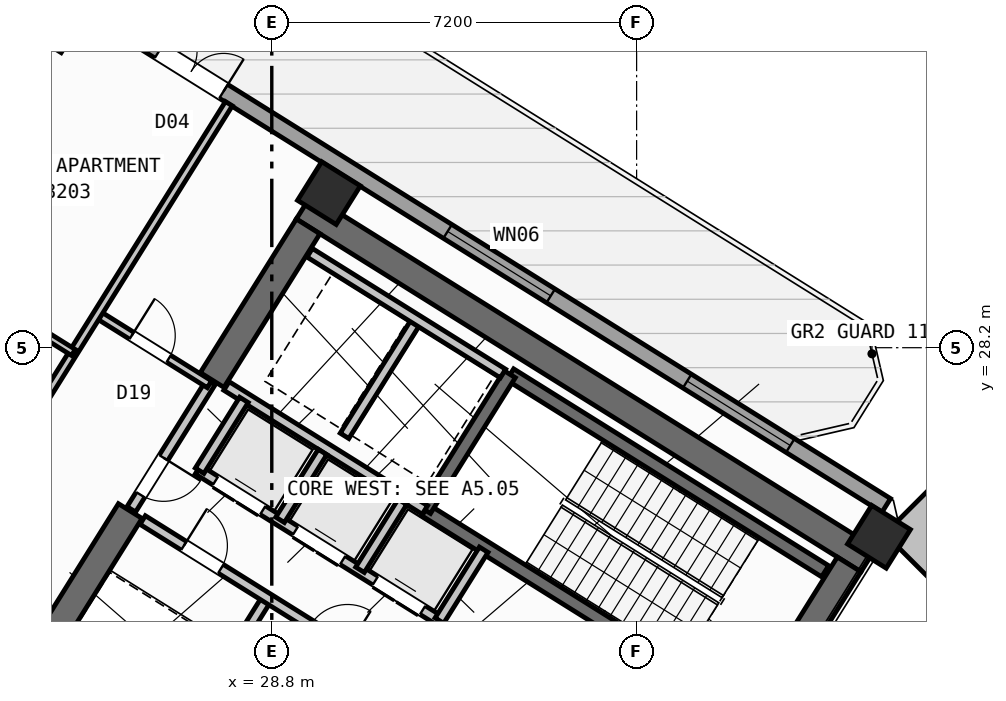
"""IFC4 building model, lengths in metres.
Left out: names, types, materials, properties, quantities, classifications, styles, units other than length and angle.
Written with IfcOpenShell. Run it as: python <this file> out.ifc"""

import sys

from ifc_helpers import new_model, si_unit, direction, frame, frame_2d, origin, origin_2d, place, context, subcontext, project, spatial, rectangle, hollow_rectangle, extrude, source, transform, mapped, element, fill, save


model = new_model("IFC4")
c1 = context("Model", 3, precision=1e-05, world=origin(), true_north=direction((0.0, 1.0)))
c2 = subcontext(c1, "Body", "Model", "MODEL_VIEW")
j1 = project(units=[si_unit("LENGTHUNIT", "METRE"), si_unit("PLANEANGLEUNIT", "RADIAN")], contexts=[c1])
p1 = place(None, origin())
s1 = spatial("IfcSite", under=j1, at=p1, CompositionType="ELEMENT")
p2 = place(p1, origin())
s2 = spatial("IfcBuilding", under=s1, at=p2, CompositionType="ELEMENT")
p3 = place(p2, frame((0.0, 0.0, 127.8)))
s3 = spatial("IfcBuildingStorey", under=s2, at=p3, CompositionType="ELEMENT", Elevation=127.8)
p4 = place(p3, frame((40.573, 24.01, 0.0), z_axis=(0.0, 0.0, 1.0), x_axis=(-0.848047359947, 0.529920442413, 0.0)))
e1 = element("IfcWall", 1, at=p4, inside=s3, PredefinedType="SHEAR", context=c2, shape_type="SweptSolid", body=[
    extrude(rectangle(XDim=13.14, YDim=0.55, at=frame_2d((6.57, 0.0))), origin(), (0.0, 0.0, 1.0), 4.55),
])
p5 = place(p3, frame((40.194, 23.922, 0.0), z_axis=(0.0, 0.0, 1.0), x_axis=(-0.529888438328, -0.848067357541, 0.0)))
e2 = element("IfcWall", 2, at=p5, inside=s3, PredefinedType="SHEAR", context=c2, shape_type="SweptSolid", body=[
    extrude(rectangle(XDim=3.575, YDim=0.55, at=frame_2d((1.788, 0.0))), origin(), (0.0, 0.0, 1.0), 4.55),
])
p6 = place(p3, frame((29.517, 30.594, 0.0), z_axis=(0.0, 0.0, 1.0), x_axis=(-0.529906864564, -0.848055844204, 0.0)))
e3 = element("IfcWall", 3, at=p6, inside=s3, PredefinedType="SHEAR", context=c2, shape_type="SweptSolid", body=[
    extrude(rectangle(XDim=3.575, YDim=0.55, at=frame_2d((1.788, 0.0))), origin(), (0.0, 0.0, 1.0), 4.55),
])
p7 = place(p3, frame((26.007, 24.976, 0.0), z_axis=(0.0, 0.0, 1.0), x_axis=(-0.529923795287, -0.848045264823, 0.0)))
e4 = element("IfcWall", 4, at=p7, inside=s3, PredefinedType="SHEAR", context=c2, shape_type="SweptSolid", body=[
    extrude(rectangle(XDim=6.425, YDim=0.55, at=frame_2d((3.212, 0.0))), origin(), (0.0, 0.0, 1.0), 4.55),
])
m1 = source(origin(), c2, "Body", "SweptSolid", [
    extrude(hollow_rectangle(XDim=0.9, YDim=0.9, WallThickness=0.036, at=origin_2d()), origin(), (0.0, 0.0, 1.0), 4.8),
])
for number, where, z_axis, x_axis in (
    (5, (40.783, 24.469, 0.0), (0.0, 0.0, 1.0), (-0.848, 0.53, 0.0)),
    (6, (29.928, 31.251, 0.0), (0.0, 0.0, 1.0), (-0.848, 0.53, 0.0)),
    (7, (24.5, 34.643, 0.0), (0.0, 0.0, 1.0), (-0.848, 0.53, 0.0)),
):
    element("IfcColumn", number, at=place(p3, frame(where, z_axis=z_axis, x_axis=x_axis)), inside=s3, PredefinedType="COLUMN", context=c2, shape_type="MappedRepresentation", body=[
        mapped(m1, transform((0.0, 0.0, 0.0), scale=1.0)),
    ])
p8 = place(p3, frame((29.268, 6.429, 0.0), z_axis=(0.0, 0.0, 1.0), x_axis=(-0.848049971435, 0.529916263149, 0.0)))
e8 = element("IfcWall", 8, at=p8, inside=s3, PredefinedType="STANDARD", context=c2, shape_type="SweptSolid", body=[
    extrude(rectangle(XDim=31.588, YDim=0.32, at=frame_2d((15.794, 0.0))), origin(), (0.0, 0.0, 1.0), 4.55),
])
p9 = place(p8, frame((15.901, 0.0, 0.0)))
e9 = element("IfcOpeningElement", 9, at=p9, cuts=e8, PredefinedType="OPENING", context=c2, shape_type="SweptSolid", body=[
    extrude(rectangle(XDim=1.2, YDim=2.15, at=frame_2d((0.6, 1.075))), frame((0.0, 0.17, 0.0), z_axis=(0.0, -1.0, 0.0), x_axis=(1.0, 0.0, 0.0)), (0.0, 0.0, 1.0), 0.34),
])
p10 = place(p8, frame((3.454, 0.0, 0.95)))
e10 = element("IfcOpeningElement", 10, at=p10, cuts=e8, PredefinedType="OPENING", context=c2, shape_type="SweptSolid", body=[
    extrude(rectangle(XDim=1.2, YDim=1.4, at=frame_2d((0.6, 0.7))), frame((0.0, 0.17, 0.0), z_axis=(0.0, -1.0, 0.0), x_axis=(1.0, 0.0, 0.0)), (0.0, 0.0, 1.0), 0.34),
])
p11 = place(p8, frame((7.561, 0.0, 0.85)))
e11 = element("IfcOpeningElement", 11, at=p11, cuts=e8, PredefinedType="OPENING", context=c2, shape_type="SweptSolid", body=[
    extrude(rectangle(XDim=1.8, YDim=1.5, at=frame_2d((0.9, 0.75))), frame((0.0, 0.17, 0.0), z_axis=(0.0, -1.0, 0.0), x_axis=(1.0, 0.0, 0.0)), (0.0, 0.0, 1.0), 0.34),
])
p12 = place(p8, frame((21.594, 0.0, 0.95)))
e12 = element("IfcOpeningElement", 12, at=p12, cuts=e8, PredefinedType="OPENING", context=c2, shape_type="SweptSolid", body=[
    extrude(rectangle(XDim=1.2, YDim=1.4, at=frame_2d((0.6, 0.7))), frame((0.0, 0.17, 0.0), z_axis=(0.0, -1.0, 0.0), x_axis=(1.0, 0.0, 0.0)), (0.0, 0.0, 1.0), 0.34),
])
p13 = place(p8, frame((29.878, 0.0, 1.0)))
e13 = element("IfcOpeningElement", 13, at=p13, cuts=e8, PredefinedType="OPENING", context=c2, shape_type="SweptSolid", body=[
    extrude(rectangle(XDim=0.9, YDim=1.25, at=frame_2d((0.45, 0.625))), frame((0.0, 0.17, 0.0), z_axis=(0.0, -1.0, 0.0), x_axis=(1.0, 0.0, 0.0)), (0.0, 0.0, 1.0), 0.34),
])
p14 = place(p8, frame((27.364, 0.0, 1.0)))
e14 = element("IfcOpeningElement", 14, at=p14, cuts=e8, PredefinedType="OPENING", context=c2, shape_type="SweptSolid", body=[
    extrude(rectangle(XDim=0.9, YDim=1.25, at=frame_2d((0.45, 0.625))), frame((0.0, 0.17, 0.0), z_axis=(0.0, -1.0, 0.0), x_axis=(1.0, 0.0, 0.0)), (0.0, 0.0, 1.0), 0.34),
])
p15 = place(p3, frame((14.138, 41.825, 0.0), z_axis=(0.0, 0.0, 1.0), x_axis=(0.848046498049, -0.529921821731, 0.0)))
e15 = element("IfcWall", 15, at=p15, inside=s3, PredefinedType="STANDARD", context=c2, shape_type="SweptSolid", body=[
    extrude(rectangle(XDim=31.588, YDim=0.32, at=frame_2d((15.794, 0.0))), origin(), (0.0, 0.0, 1.0), 4.55),
])
p16 = place(p15, frame((9.69, 0.0, 0.0)))
e16 = element("IfcOpeningElement", 16, at=p16, cuts=e15, PredefinedType="OPENING", context=c2, shape_type="SweptSolid", body=[
    extrude(rectangle(XDim=1.05, YDim=2.15, at=frame_2d((0.525, 1.075))), frame((0.0, 0.17, 0.0), z_axis=(0.0, -1.0, 0.0), x_axis=(1.0, 0.0, 0.0)), (0.0, 0.0, 1.0), 0.34),
])
p17 = place(p15, frame((14.666, 0.0, 0.0)))
e17 = element("IfcOpeningElement", 17, at=p17, cuts=e15, PredefinedType="OPENING", context=c2, shape_type="SweptSolid", body=[
    extrude(rectangle(XDim=1.5, YDim=2.25, at=frame_2d((0.75, 1.125))), frame((0.0, 0.17, 0.0), z_axis=(0.0, -1.0, 0.0), x_axis=(1.0, 0.0, 0.0)), (0.0, 0.0, 1.0), 0.34),
])
p18 = place(p15, frame((0.791, 0.0, 0.85)))
e18 = element("IfcOpeningElement", 18, at=p18, cuts=e15, PredefinedType="OPENING", context=c2, shape_type="SweptSolid", body=[
    extrude(rectangle(XDim=1.8, YDim=1.5, at=frame_2d((0.9, 0.75))), frame((0.0, 0.17, 0.0), z_axis=(0.0, -1.0, 0.0), x_axis=(1.0, 0.0, 0.0)), (0.0, 0.0, 1.0), 0.34),
])
p19 = place(p15, frame((3.996, 0.0, 0.95)))
e19 = element("IfcOpeningElement", 19, at=p19, cuts=e15, PredefinedType="OPENING", context=c2, shape_type="SweptSolid", body=[
    extrude(rectangle(XDim=1.2, YDim=1.4, at=frame_2d((0.6, 0.7))), frame((0.0, 0.17, 0.0), z_axis=(0.0, -1.0, 0.0), x_axis=(1.0, 0.0, 0.0)), (0.0, 0.0, 1.0), 0.34),
])
p20 = place(p15, frame((7.582, 0.0, 0.95)))
e20 = element("IfcOpeningElement", 20, at=p20, cuts=e15, PredefinedType="OPENING", context=c2, shape_type="SweptSolid", body=[
    extrude(rectangle(XDim=1.2, YDim=1.4, at=frame_2d((0.6, 0.7))), frame((0.0, 0.17, 0.0), z_axis=(0.0, -1.0, 0.0), x_axis=(1.0, 0.0, 0.0)), (0.0, 0.0, 1.0), 0.34),
])
p21 = place(p15, frame((21.381, 0.0, 0.75)))
e21 = element("IfcOpeningElement", 21, at=p21, cuts=e15, PredefinedType="OPENING", context=c2, shape_type="SweptSolid", body=[
    extrude(rectangle(XDim=2.4, YDim=1.6, at=frame_2d((1.2, 0.8))), frame((0.0, 0.17, 0.0), z_axis=(0.0, -1.0, 0.0), x_axis=(1.0, 0.0, 0.0)), (0.0, 0.0, 1.0), 0.34),
])
p22 = place(p15, frame((26.956, 0.0, 0.75)))
e22 = element("IfcOpeningElement", 22, at=p22, cuts=e15, PredefinedType="OPENING", context=c2, shape_type="SweptSolid", body=[
    extrude(rectangle(XDim=2.4, YDim=1.6, at=frame_2d((1.2, 0.8))), frame((0.0, 0.17, 0.0), z_axis=(0.0, -1.0, 0.0), x_axis=(1.0, 0.0, 0.0)), (0.0, 0.0, 1.0), 0.34),
])
p23 = place(p3, frame((39.721, 23.788, 0.0), z_axis=(0.0, 0.0, 1.0), x_axis=(-0.848054434086, 0.529909121291, 0.0)))
e23 = element("IfcWall", 23, at=p23, inside=s3, PredefinedType="SHEAR", context=c2, shape_type="SweptSolid", body=[
    extrude(rectangle(XDim=7.33, YDim=0.26, at=frame_2d((3.665, 0.0))), origin(), (0.0, 0.0, 1.0), 4.55),
])
p24 = place(p3, frame((38.046, 21.108, 0.0), z_axis=(0.0, 0.0, 1.0), x_axis=(-0.848054434086, 0.529909121291, 0.0)))
e24 = element("IfcWall", 24, at=p24, inside=s3, PredefinedType="SHEAR", context=c2, shape_type="SweptSolid", body=[
    extrude(rectangle(XDim=7.33, YDim=0.26, at=frame_2d((3.665, 0.0))), origin(), (0.0, 0.0, 1.0), 4.55),
])
p25 = place(p24, frame((0.22, 0.0, 0.0)))
e25 = element("IfcOpeningElement", 25, at=p25, cuts=e24, PredefinedType="OPENING", context=c2, shape_type="SweptSolid", body=[
    extrude(rectangle(XDim=1.1, YDim=2.1, at=frame_2d((0.55, 1.05))), frame((0.0, 0.14, 0.0), z_axis=(0.0, -1.0, 0.0), x_axis=(1.0, 0.0, 0.0)), (0.0, 0.0, 1.0), 0.28),
])
p26 = place(p3, frame((33.496, 27.677, 0.0), z_axis=(0.0, 0.0, 1.0), x_axis=(-0.529908658664, -0.84805472316, 0.0)))
e26 = element("IfcWall", 26, at=p26, inside=s3, PredefinedType="SHEAR", context=c2, shape_type="SweptSolid", body=[
    extrude(rectangle(XDim=3.16, YDim=0.26, at=frame_2d((1.58, 0.0))), origin(), (0.0, 0.0, 1.0), 4.55),
])
p27 = place(p3, frame((31.822, 24.998, 0.0), z_axis=(0.0, 0.0, 1.0), x_axis=(-0.848036912365, 0.52993716162, 0.0)))
e27 = element("IfcWall", 27, at=p27, inside=s3, PredefinedType="STANDARD", context=c2, shape_type="SweptSolid", body=[
    extrude(rectangle(XDim=4.618, YDim=0.2, at=frame_2d((2.309, 0.0))), origin(), (0.0, 0.0, 1.0), 4.54),
])
p28 = place(p3, frame((32.108, 22.814, 0.0), z_axis=(0.0, 0.0, 1.0), x_axis=(-0.848042229521, 0.529928652696, 0.0)))
e28 = element("IfcWall", 28, at=p28, inside=s3, PredefinedType="STANDARD", context=c2, shape_type="SweptSolid", body=[
    extrude(rectangle(XDim=5.62, YDim=0.2, at=frame_2d((2.81, 0.0))), origin(), (0.0, 0.0, 1.0), 4.54),
])
p29 = place(p28, frame((0.39, 0.0, 0.0)))
e29 = element("IfcOpeningElement", 29, at=p29, cuts=e28, PredefinedType="OPENING", context=c2, shape_type="SweptSolid", body=[
    extrude(rectangle(XDim=1.1, YDim=2.15, at=frame_2d((0.55, 1.075))), frame((0.0, 0.11, 0.0), z_axis=(0.0, -1.0, 0.0), x_axis=(1.0, 0.0, 0.0)), (0.0, 0.0, 1.0), 0.22),
])
p30 = place(p28, frame((2.25, 0.0, 0.0)))
e30 = element("IfcOpeningElement", 30, at=p30, cuts=e28, PredefinedType="OPENING", context=c2, shape_type="SweptSolid", body=[
    extrude(rectangle(XDim=1.1, YDim=2.15, at=frame_2d((0.55, 1.075))), frame((0.0, 0.11, 0.0), z_axis=(0.0, -1.0, 0.0), x_axis=(1.0, 0.0, 0.0)), (0.0, 0.0, 1.0), 0.22),
])
p31 = place(p28, frame((4.11, 0.0, 0.0)))
e31 = element("IfcOpeningElement", 31, at=p31, cuts=e28, PredefinedType="OPENING", context=c2, shape_type="SweptSolid", body=[
    extrude(rectangle(XDim=1.1, YDim=2.15, at=frame_2d((0.55, 1.075))), frame((0.0, 0.11, 0.0), z_axis=(0.0, -1.0, 0.0), x_axis=(1.0, 0.0, 0.0)), (0.0, 0.0, 1.0), 0.22),
])
p32 = place(p3, frame((32.982, 24.213, 0.0), z_axis=(0.0, 0.0, 1.0), x_axis=(-0.529839334948, -0.84809803628, 0.0)))
e32 = element("IfcWall", 32, at=p32, inside=s3, PredefinedType="STANDARD", context=c2, shape_type="SweptSolid", body=[
    extrude(rectangle(XDim=1.65, YDim=0.2, at=frame_2d((0.825, 0.0))), origin(), (0.0, 0.0, 1.0), 4.54),
])
p33 = place(p3, frame((28.25, 27.17, 0.0), z_axis=(0.0, 0.0, 1.0), x_axis=(-0.529905827651, -0.848056492117, 0.0)))
e33 = element("IfcWall", 33, at=p33, inside=s3, PredefinedType="STANDARD", context=c2, shape_type="SweptSolid", body=[
    extrude(rectangle(XDim=1.65, YDim=0.2, at=frame_2d((0.825, 0.0))), origin(), (0.0, 0.0, 1.0), 4.54),
])
p34 = place(p3, frame((31.645, 28.716, 0.0), z_axis=(0.0, 0.0, 1.0), x_axis=(-0.52986693015, -0.848080795876, 0.0)))
e34 = element("IfcWall", 34, at=p34, inside=s3, PredefinedType="STANDARD", context=c2, shape_type="SweptSolid", body=[
    extrude(rectangle(XDim=2.66, YDim=0.2, at=frame_2d((1.33, 0.0))), origin(), (0.0, 0.0, 1.0), 4.54),
])
p35 = place(p3, frame((33.363, 27.69, 0.0), z_axis=(0.0, 0.0, 1.0), x_axis=(-0.848047090064, 0.529920874315, 0.0)))
e35 = element("IfcWall", 35, at=p35, inside=s3, PredefinedType="STANDARD", context=c2, shape_type="SweptSolid", body=[
    extrude(rectangle(XDim=4.498, YDim=0.2, at=frame_2d((2.249, 0.0))), origin(), (0.0, 0.0, 1.0), 4.54),
])
for number, where, z_axis, x_axis in (
    (36, (31.379, 25.156, 0.0), (0.0, 0.0, 1.0), (-0.53, -0.848, 0.0)),
    (37, (29.801, 26.142, 0.0), (0.0, 0.0, 1.0), (-0.53, -0.848, 0.0)),
):
    element("IfcWall", number, at=place(p3, frame(where, z_axis=z_axis, x_axis=x_axis)), inside=s3, PredefinedType="STANDARD", context=c2, shape_type="SweptSolid", body=[
        extrude(rectangle(XDim=1.58, YDim=0.2, at=frame_2d((0.79, 0.0))), origin(), (0.0, 0.0, 1.0), 4.54),
    ])
p36 = place(p3, frame((28.71, 23.263, 0.0), z_axis=(0.0, 0.0, 1.0), x_axis=(-0.529907497854, -0.848055448493, 0.0)))
e38 = element("IfcWall", 38, at=p36, inside=s3, PredefinedType="STANDARD", context=c2, shape_type="SweptSolid", body=[
    extrude(rectangle(XDim=2.88, YDim=0.2, at=frame_2d((1.44, 0.0))), origin(), (0.0, 0.0, 1.0), 4.54),
])
p37 = place(p3, frame((31.525, 21.504, 0.0), z_axis=(0.0, 0.0, 1.0), x_axis=(-0.848040211232, 0.529931882541, 0.0)))
e39 = element("IfcWall", 39, at=p37, inside=s3, PredefinedType="STANDARD", context=c2, shape_type="SweptSolid", body=[
    extrude(rectangle(XDim=6.218, YDim=0.2, at=frame_2d((3.109, 0.0))), origin(), (0.0, 0.0, 1.0), 4.54),
])
p38 = place(p37, frame((4.4, 0.0, 0.0)))
e40 = element("IfcOpeningElement", 40, at=p38, cuts=e39, PredefinedType="OPENING", context=c2, shape_type="SweptSolid", body=[
    extrude(rectangle(XDim=0.86, YDim=2.05, at=frame_2d((0.43, 1.025))), frame((0.0, 0.11, 0.0), z_axis=(0.0, -1.0, 0.0), x_axis=(1.0, 0.0, 0.0)), (0.0, 0.0, 1.0), 0.22),
])
p39 = place(p37, frame((1.45, 0.0, 0.0)))
e41 = element("IfcOpeningElement", 41, at=p39, cuts=e39, PredefinedType="OPENING", context=c2, shape_type="SweptSolid", body=[
    extrude(rectangle(XDim=0.86, YDim=2.05, at=frame_2d((0.43, 1.025))), frame((0.0, 0.11, 0.0), z_axis=(0.0, -1.0, 0.0), x_axis=(1.0, 0.0, 0.0)), (0.0, 0.0, 1.0), 0.22),
])
p40 = place(p3, frame((27.596, 27.52, 0.0), z_axis=(0.0, 0.0, 1.0), x_axis=(-0.529865479138, -0.848081702443, 0.0)))
e42 = element("IfcWall", 42, at=p40, inside=s3, PredefinedType="STANDARD", context=c2, shape_type="SweptSolid", body=[
    extrude(rectangle(XDim=2.96, YDim=0.2, at=frame_2d((1.48, 0.0))), origin(), (0.0, 0.0, 1.0), 4.54),
])
p41 = place(p40, frame((1.76, 0.0, 0.0)))
e43 = element("IfcOpeningElement", 43, at=p41, cuts=e42, PredefinedType="OPENING", context=c2, shape_type="SweptSolid", body=[
    extrude(rectangle(XDim=0.86, YDim=2.05, at=frame_2d((0.43, 1.025))), frame((0.0, 0.11, 0.0), z_axis=(0.0, -1.0, 0.0), x_axis=(1.0, 0.0, 0.0)), (0.0, 0.0, 1.0), 0.22),
])
p42 = place(p3, frame((27.57, 27.478, 0.0), z_axis=(0.0, 0.0, 1.0), x_axis=(-0.848050851465, 0.529914854792, 0.0)))
e44 = element("IfcWall", 44, at=p42, inside=s3, PredefinedType="PARTITIONING", context=c2, shape_type="SweptSolid", body=[
    extrude(rectangle(XDim=2.61, YDim=0.16, at=frame_2d((1.305, 0.0))), origin(), (0.0, 0.0, 1.0), 4.54),
])
p43 = place(p42, frame((0.95, 0.0, 0.0)))
e45 = element("IfcOpeningElement", 45, at=p43, cuts=e44, PredefinedType="OPENING", context=c2, shape_type="SweptSolid", body=[
    extrude(rectangle(XDim=0.86, YDim=2.05, at=frame_2d((0.43, 1.025))), frame((0.0, 0.09, 0.0), z_axis=(0.0, -1.0, 0.0), x_axis=(1.0, 0.0, 0.0)), (0.0, 0.0, 1.0), 0.18),
])
p44 = place(p3, frame((27.953, 33.016, 0.0), z_axis=(0.0, 0.0, 1.0), x_axis=(-0.529909450694, -0.848054228257, 0.0)))
e46 = element("IfcWall", 46, at=p44, inside=s3, PredefinedType="PARTITIONING", context=c2, shape_type="SweptSolid", body=[
    extrude(rectangle(XDim=10.3, YDim=0.16, at=frame_2d((5.15, 0.0))), origin(), (0.0, 0.0, 1.0), 4.54),
])
p45 = place(p3, frame((24.885, 28.106, 0.0), z_axis=(0.0, 0.0, 1.0), x_axis=(-0.848059820872, 0.529900500304, 0.0)))
e47 = element("IfcWall", 47, at=p45, inside=s3, PredefinedType="PLUMBINGWALL", context=c2, shape_type="SweptSolid", body=[
    extrude(rectangle(XDim=3.79, YDim=0.14, at=frame_2d((1.895, 0.0))), origin(), (0.0, 0.0, 1.0), 4.54),
])
p46 = place(p45, frame((2.23, 0.0, 0.0)))
e48 = element("IfcOpeningElement", 48, at=p46, cuts=e47, PredefinedType="OPENING", context=c2, shape_type="SweptSolid", body=[
    extrude(rectangle(XDim=0.92, YDim=2.08, at=frame_2d((0.46, 1.04))), frame((0.0, 0.08, 0.0), z_axis=(0.0, -1.0, 0.0), x_axis=(1.0, 0.0, 0.0)), (0.0, 0.0, 1.0), 0.16),
])
m2 = source(origin(), c2, "Body", "SweptSolid", [
    extrude(rectangle(XDim=1.5, YDim=2.25, at=frame_2d((0.75, 1.125))), frame((0.0, 0.025, 0.0), z_axis=(0.0, -1.0, 0.0), x_axis=(1.0, 0.0, 0.0)), (0.0, 0.0, 1.0), 0.05),
])
p47 = place(p17, origin())
e49 = element("IfcDoor", 49, at=p47, inside=s3, OperationType="DOUBLE_DOOR_SINGLE_SWING", PredefinedType="DOOR", context=c2, shape_type="MappedRepresentation", body=[
    mapped(m2, transform((0.0, 0.0, 0.0), scale=1.0)),
])
fill(e17, e49)
m3 = source(origin(), c2, "Body", "SweptSolid", [
    extrude(rectangle(XDim=2.4, YDim=1.6, at=frame_2d((1.2, 0.8))), frame((0.0, 0.03, 0.0), z_axis=(0.0, -1.0, 0.0), x_axis=(1.0, 0.0, 0.0)), (0.0, 0.0, 1.0), 0.06),
])
p48 = place(p21, origin())
e50 = element("IfcWindow", 50, at=p48, inside=s3, PartitioningType="SINGLE_PANEL", PredefinedType="WINDOW", context=c2, shape_type="MappedRepresentation", body=[
    mapped(m3, transform((0.0, 0.0, 0.0), scale=1.0)),
])
fill(e21, e50)
p49 = place(p22, origin())
e51 = element("IfcWindow", 51, at=p49, inside=s3, PartitioningType="SINGLE_PANEL", PredefinedType="WINDOW", context=c2, shape_type="MappedRepresentation", body=[
    mapped(m3, transform((0.0, 0.0, 0.0), scale=1.0)),
])
fill(e22, e51)
m4 = source(origin(), c2, "Body", "SweptSolid", [
    extrude(rectangle(XDim=1.1, YDim=2.15, at=frame_2d((0.55, 1.075))), frame((0.0, 0.025, 0.0), z_axis=(0.0, -1.0, 0.0), x_axis=(1.0, 0.0, 0.0)), (0.0, 0.0, 1.0), 0.05),
])
p50 = place(p29, origin())
e52 = element("IfcDoor", 52, at=p50, inside=s3, OperationType="DOUBLE_DOOR_SLIDING", PredefinedType="DOOR", context=c2, shape_type="MappedRepresentation", body=[
    mapped(m4, transform((0.0, 0.0, 0.0), scale=1.0)),
])
fill(e29, e52)
p51 = place(p30, origin())
e53 = element("IfcDoor", 53, at=p51, inside=s3, OperationType="DOUBLE_DOOR_SLIDING", PredefinedType="DOOR", context=c2, shape_type="MappedRepresentation", body=[
    mapped(m4, transform((0.0, 0.0, 0.0), scale=1.0)),
])
fill(e30, e53)
p52 = place(p31, origin())
e54 = element("IfcDoor", 54, at=p52, inside=s3, OperationType="DOUBLE_DOOR_SLIDING", PredefinedType="DOOR", context=c2, shape_type="MappedRepresentation", body=[
    mapped(m4, transform((0.0, 0.0, 0.0), scale=1.0)),
])
fill(e31, e54)
m5 = source(origin(), c2, "Body", "SweptSolid", [
    extrude(rectangle(XDim=0.86, YDim=2.05, at=frame_2d((0.43, 1.025))), frame((0.0, 0.025, 0.0), z_axis=(0.0, -1.0, 0.0), x_axis=(1.0, 0.0, 0.0)), (0.0, 0.0, 1.0), 0.05),
])
p53 = place(p38, frame((0.86, 0.0, 0.0), z_axis=(0.0, 0.0, 1.0), x_axis=(-1.0, 0.0, 0.0)))
e55 = element("IfcDoor", 55, at=p53, inside=s3, OperationType="SINGLE_SWING_LEFT", PredefinedType="DOOR", context=c2, shape_type="MappedRepresentation", body=[
    mapped(m5, transform((0.0, 0.0, 0.0), scale=1.0)),
])
fill(e40, e55)
p54 = place(p43, frame((0.86, 0.0, 0.0), z_axis=(0.0, 0.0, 1.0), x_axis=(-1.0, 0.0, 0.0)))
e56 = element("IfcDoor", 56, at=p54, inside=s3, OperationType="SINGLE_SWING_LEFT", PredefinedType="DOOR", context=c2, shape_type="MappedRepresentation", body=[
    mapped(m5, transform((0.0, 0.0, 0.0), scale=1.0)),
])
fill(e45, e56)
p55 = place(p41, origin())
e57 = element("IfcDoor", 57, at=p55, inside=s3, OperationType="SINGLE_SWING_LEFT", PredefinedType="DOOR", context=c2, shape_type="MappedRepresentation", body=[
    mapped(m5, transform((0.0, 0.0, 0.0), scale=1.0)),
])
fill(e43, e57)
save(model, sys.argv[1])
